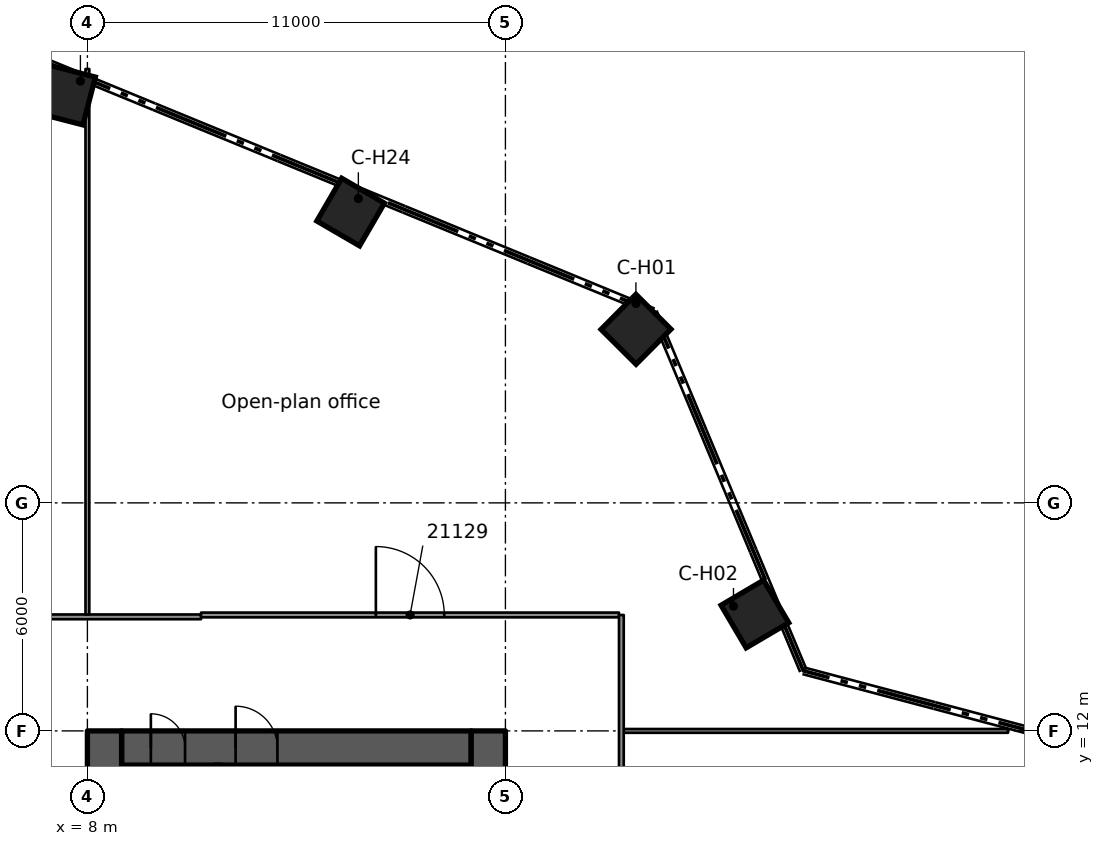
"""IFC4 building model, lengths in metres.
Left out: names, types, materials, properties, quantities, classifications, styles, units other than length and angle.
Written with IfcOpenShell. Run it as: python <this file> out.ifc"""

import sys

from ifc_helpers import new_model, si_unit, direction, frame, frame_2d, origin, origin_2d, place, context, subcontext, project, spatial, rectangle, extrude, element, fill, save


model = new_model("IFC4")
c1 = context("Model", 3, precision=1e-05, world=origin(), true_north=direction((0.0, 1.0)))
c2 = subcontext(c1, "Body", "Model", "MODEL_VIEW")
j1 = project(units=[si_unit("LENGTHUNIT", "METRE"), si_unit("PLANEANGLEUNIT", "RADIAN")], contexts=[c1])
p1 = place(None, origin())
s1 = spatial("IfcSite", under=j1, at=p1, CompositionType="ELEMENT")
p2 = place(p1, origin())
s2 = spatial("IfcBuilding", under=s1, at=p2, CompositionType="ELEMENT")
p3 = place(p2, frame((0.0, 0.0, 105.7)))
s3 = spatial("IfcBuildingStorey", under=s2, at=p3, CompositionType="ELEMENT", Elevation=105.7)
p4 = place(p3, frame((8.9, 11.55, 0.0), z_axis=(0.0, 0.0, 1.0), x_axis=(1.0, 0.0, 0.0)))
e1 = element("IfcWall", 1, at=p4, inside=s3, PredefinedType="SHEAR", context=c2, shape_type="SweptSolid", body=[
    extrude(rectangle(XDim=9.2, YDim=0.9, at=frame_2d((4.6, 0.0))), origin(), (0.0, 0.0, 1.0), 3.5),
])
p5 = place(p4, frame((3.0, 0.0, 0.0)))
e2 = element("IfcOpeningElement", 2, at=p5, cuts=e1, PredefinedType="OPENING", context=c2, shape_type="SweptSolid", body=[
    extrude(rectangle(XDim=1.1, YDim=2.1, at=frame_2d((0.55, 1.05))), frame((0.0, 0.46, 0.0), z_axis=(0.0, -1.0, 0.0), x_axis=(1.0, 0.0, 0.0)), (0.0, 0.0, 1.0), 0.92),
])
p6 = place(p4, frame((0.77, 0.0, 0.0)))
e3 = element("IfcOpeningElement", 3, at=p6, cuts=e1, PredefinedType="OPENING", context=c2, shape_type="SweptSolid", body=[
    extrude(rectangle(XDim=0.9, YDim=2.1, at=frame_2d((0.45, 1.05))), frame((0.0, 0.46, 0.0), z_axis=(0.0, -1.0, 0.0), x_axis=(1.0, 0.0, 0.0)), (0.0, 0.0, 1.0), 0.92),
])
p7 = place(p3, frame((8.45, -12.0, 0.0), z_axis=(0.0, 0.0, 1.0), x_axis=(0.0, 1.0, 0.0)))
e4 = element("IfcWall", 4, at=p7, inside=s3, PredefinedType="SHEAR", context=c2, shape_type="SweptSolid", body=[
    extrude(rectangle(XDim=24.0, YDim=0.9, at=frame_2d((12.0, 0.0))), origin(), (0.0, 0.0, 1.0), 3.5),
])
p8 = place(p7, frame((12.6, 0.0, 0.0)))
e5 = element("IfcOpeningElement", 5, at=p8, cuts=e4, PredefinedType="OPENING", context=c2, shape_type="SweptSolid", body=[
    extrude(rectangle(XDim=1.8, YDim=2.1, at=frame_2d((0.9, 1.05))), frame((0.0, 0.46, 0.0), z_axis=(0.0, -1.0, 0.0), x_axis=(1.0, 0.0, 0.0)), (0.0, 0.0, 1.0), 0.92),
])
p9 = place(p7, frame((3.25, 0.0, 0.0)))
e6 = element("IfcOpeningElement", 6, at=p9, cuts=e4, PredefinedType="OPENING", context=c2, shape_type="SweptSolid", body=[
    extrude(rectangle(XDim=1.1, YDim=2.1, at=frame_2d((0.55, 1.05))), frame((0.0, 0.46, 0.0), z_axis=(0.0, -1.0, 0.0), x_axis=(1.0, 0.0, 0.0)), (0.0, 0.0, 1.0), 0.92),
])
p10 = place(p3, frame((18.55, -12.0, 0.0), z_axis=(0.0, 0.0, 1.0), x_axis=(0.0, 1.0, 0.0)))
e7 = element("IfcWall", 7, at=p10, inside=s3, PredefinedType="SHEAR", context=c2, shape_type="SweptSolid", body=[
    extrude(rectangle(XDim=24.0, YDim=0.9, at=frame_2d((12.0, 0.0))), origin(), (0.0, 0.0, 1.0), 3.5),
])
p11 = place(p10, frame((12.1, 0.0, 0.0)))
e8 = element("IfcOpeningElement", 8, at=p11, cuts=e7, PredefinedType="OPENING", context=c2, shape_type="SweptSolid", body=[
    extrude(rectangle(XDim=1.8, YDim=2.1, at=frame_2d((0.9, 1.05))), frame((0.0, 0.46, 0.0), z_axis=(0.0, -1.0, 0.0), x_axis=(1.0, 0.0, 0.0)), (0.0, 0.0, 1.0), 0.92),
])
for number, where, z_axis, x_axis in (
    (9, (22.436, 22.567, 0.0), (0.0, 0.0, 1.0), (0.705, 0.709, 0.0)),
    (10, (25.565, 15.076, 0.0), (0.0, 0.0, 1.0), (0.861, 0.508, 0.0)),
    (11, (7.417, 28.737, 0.0), (0.0, 0.0, 1.0), (0.25, 0.968, 0.0)),
    (12, (14.927, 25.652, 0.0), (0.0, 0.0, 1.0), (0.503, 0.864, 0.0)),
):
    element("IfcColumn", number, at=place(p3, frame(where, z_axis=z_axis, x_axis=x_axis)), inside=s3, PredefinedType="COLUMN", context=c2, shape_type="SweptSolid", body=[
        extrude(rectangle(XDim=1.3, YDim=1.3, at=origin_2d()), origin(), (0.0, 0.0, 1.0), 3.5),
    ])
p12 = place(p3, frame((11.44, 11.1, 0.0), z_axis=(0.0, 0.0, 1.0), x_axis=(0.0, -1.0, 0.0)))
e13 = element("IfcWall", 13, at=p12, inside=s3, PredefinedType="SOLIDWALL", context=c2, shape_type="SweptSolid", body=[
    extrude(rectangle(XDim=4.125, YDim=0.2, at=frame_2d((2.062, 0.0))), origin(), (0.0, 0.0, 1.0), 3.09),
])
p13 = place(p3, frame((22.113, 12.0, 0.0), z_axis=(0.0, 0.0, 1.0), x_axis=(1.0, 0.0, 0.0)))
e14 = element("IfcWall", 14, at=p13, inside=s3, PredefinedType="PARTITIONING", context=c2, shape_type="SweptSolid", body=[
    extrude(rectangle(XDim=10.113, YDim=0.1, at=frame_2d((5.057, 0.0))), origin(), (0.0, 0.0, 1.0), 3.08),
])
p14 = place(p3, frame((-10.99, 15.001, 0.0), z_axis=(0.0, 0.0, 1.0), x_axis=(1.0, 0.0, 0.0)))
e15 = element("IfcWall", 15, at=p14, inside=s3, PredefinedType="PARTITIONING", context=c2, shape_type="SweptSolid", body=[
    extrude(rectangle(XDim=21.98, YDim=0.125, at=frame_2d((10.99, 0.0))), origin(), (0.0, 0.0, 1.0), 3.08),
])
p15 = place(p14, frame((13.345, 0.0, 0.0)))
e16 = element("IfcOpeningElement", 16, at=p15, cuts=e15, PredefinedType="OPENING", context=c2, shape_type="SweptSolid", body=[
    extrude(rectangle(XDim=1.8, YDim=2.1, at=frame_2d((0.9, 1.05))), frame((0.0, 0.073, 0.0), z_axis=(0.0, -1.0, 0.0), x_axis=(1.0, 0.0, 0.0)), (0.0, 0.0, 1.0), 0.145),
])
p16 = place(p14, frame((3.85, 0.0, 0.0)))
e17 = element("IfcOpeningElement", 17, at=p16, cuts=e15, PredefinedType="OPENING", context=c2, shape_type="SweptSolid", body=[
    extrude(rectangle(XDim=1.8, YDim=2.1, at=frame_2d((0.9, 1.05))), frame((0.0, 0.073, 0.0), z_axis=(0.0, -1.0, 0.0), x_axis=(1.0, 0.0, 0.0)), (0.0, 0.0, 1.0), 0.145),
])
p17 = place(p3, frame((10.991, 15.051, 0.0), z_axis=(0.0, 0.0, 1.0), x_axis=(1.0, 0.0, 0.0)))
e18 = element("IfcWall", 18, at=p17, inside=s3, PredefinedType="PARTITIONING", context=c2, shape_type="SweptSolid", body=[
    extrude(rectangle(XDim=10.997, YDim=0.125, at=frame_2d((5.499, 0.0))), origin(), (0.0, 0.0, 1.0), 3.08),
])
p18 = place(p17, frame((4.6, 0.0, 0.0)))
e19 = element("IfcOpeningElement", 19, at=p18, cuts=e18, PredefinedType="OPENING", context=c2, shape_type="SweptSolid", body=[
    extrude(rectangle(XDim=1.8, YDim=2.1, at=frame_2d((0.9, 1.05))), frame((0.0, 0.073, 0.0), z_axis=(0.0, -1.0, 0.0), x_axis=(1.0, 0.0, 0.0)), (0.0, 0.0, 1.0), 0.145),
])
p19 = place(p3, frame((32.202, -2.205, 0.0), z_axis=(0.0, 0.0, 1.0), x_axis=(0.256002681219, 0.966676071499, 0.0)))
e20 = element("IfcWall", 20, at=p19, inside=s3, PredefinedType="PARTITIONING", context=c2, shape_type="SweptSolid", body=[
    extrude(rectangle(XDim=14.137, YDim=0.1, at=frame_2d((7.069, 0.0))), origin(), (0.0, 0.0, 1.0), 3.08),
])
p20 = place(p3, frame((22.051, 15.05, 0.0), z_axis=(0.0, 0.0, 1.0), x_axis=(0.0, -1.0, 0.0)))
e21 = element("IfcWall", 21, at=p20, inside=s3, PredefinedType="PARTITIONING", context=c2, shape_type="SweptSolid", body=[
    extrude(rectangle(XDim=16.436, YDim=0.125, at=frame_2d((8.218, 0.0))), origin(), (0.0, 0.0, 1.0), 3.08),
])
p21 = place(p20, frame((9.4, 0.0, 0.0)))
e22 = element("IfcOpeningElement", 22, at=p21, cuts=e21, PredefinedType="OPENING", context=c2, shape_type="SweptSolid", body=[
    extrude(rectangle(XDim=0.9, YDim=2.1, at=frame_2d((0.45, 1.05))), frame((0.0, 0.073, 0.0), z_axis=(0.0, -1.0, 0.0), x_axis=(1.0, 0.0, 0.0)), (0.0, 0.0, 1.0), 0.145),
])
p22 = place(p3, frame((8.0, 15.063, 0.0), z_axis=(0.0, 0.0, 1.0), x_axis=(0.0, 1.0, 0.0)))
e23 = element("IfcWall", 23, at=p22, inside=s3, PredefinedType="PARTITIONING", context=c2, shape_type="SweptSolid", body=[
    extrude(rectangle(XDim=14.354, YDim=0.1, at=frame_2d((7.177, 0.0))), origin(), (0.0, 0.0, 1.0), 3.08),
])
p23 = place(p5, origin())
e24 = element("IfcDoor", 24, at=p23, inside=s3, OperationType="SINGLE_SWING_LEFT", PredefinedType="DOOR", context=c2, shape_type="SweptSolid", body=[
    extrude(rectangle(XDim=1.1, YDim=2.1, at=frame_2d((0.55, 1.05))), frame((0.0, 0.025, 0.0), z_axis=(0.0, -1.0, 0.0), x_axis=(1.0, 0.0, 0.0)), (0.0, 0.0, 1.0), 0.05),
])
fill(e2, e24)
p24 = place(p6, origin())
e25 = element("IfcDoor", 25, at=p24, inside=s3, OperationType="SINGLE_SWING_LEFT", PredefinedType="DOOR", context=c2, shape_type="SweptSolid", body=[
    extrude(rectangle(XDim=0.9, YDim=2.1, at=frame_2d((0.45, 1.05))), frame((0.0, 0.025, 0.0), z_axis=(0.0, -1.0, 0.0), x_axis=(1.0, 0.0, 0.0)), (0.0, 0.0, 1.0), 0.05),
])
fill(e3, e25)
p25 = place(p18, origin())
e26 = element("IfcDoor", 26, at=p25, inside=s3, OperationType="DOUBLE_DOOR_SINGLE_SWING", PredefinedType="DOOR", context=c2, shape_type="SweptSolid", body=[
    extrude(rectangle(XDim=1.8, YDim=2.1, at=frame_2d((0.9, 1.05))), frame((0.0, 0.025, 0.0), z_axis=(0.0, -1.0, 0.0), x_axis=(1.0, 0.0, 0.0)), (0.0, 0.0, 1.0), 0.05),
])
fill(e19, e26)
save(model, sys.argv[1])
